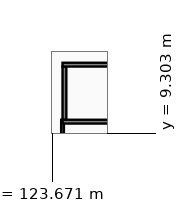
"""IFC4 building model, lengths in metres.
Left out: names, types, materials, properties, quantities, classifications, styles, units other than length and angle.
Written with IfcOpenShell. Run it as: python <this file> out.ifc"""

import sys

from ifc_helpers import new_model, si_unit, direction, frame, frame_2d, origin, place, context, subcontext, project, spatial, rectangle, extrude, element, fill, save


model = new_model("IFC4")
c1 = context("Model", 3, precision=1e-05, world=origin(), true_north=direction((0.0, 1.0)))
c2 = subcontext(c1, "Body", "Model", "MODEL_VIEW")
j1 = project(units=[si_unit("LENGTHUNIT", "METRE"), si_unit("PLANEANGLEUNIT", "RADIAN")], contexts=[c1])
p1 = place(None, origin())
s1 = spatial("IfcSite", under=j1, at=p1, CompositionType="ELEMENT")
p2 = place(p1, origin())
s2 = spatial("IfcBuilding", under=s1, at=p2, CompositionType="ELEMENT")
p3 = place(p2, frame((0.0, 0.0, 5.4)))
s3 = spatial("IfcBuildingStorey", under=s2, at=p3, CompositionType="ELEMENT", Elevation=5.4)
p4 = place(p3, frame((124.35, 8.96, 0.0), z_axis=(0.0, 0.0, 1.0), x_axis=(0.0, 1.0, 0.0)))
e1 = element("IfcWall", 1, at=p4, inside=s3, PredefinedType="PARTITIONING", context=c2, shape_type="SweptSolid", body=[
    extrude(rectangle(XDim=1.24, YDim=0.18, at=frame_2d((0.62, 0.0))), origin(), (0.0, 0.0, 1.0), 3.67),
])
p5 = place(p3, frame((124.475, 13.7, 0.0), z_axis=(0.0, 0.0, 1.0), x_axis=(0.0, -1.0, 0.0)))
e2 = element("IfcWall", 2, at=p5, inside=s3, PredefinedType="SHEAR", context=c2, shape_type="SweptSolid", body=[
    extrude(rectangle(XDim=3.5, YDim=0.25, at=frame_2d((1.75, 0.0))), origin(), (0.0, 0.0, 1.0), 4.2),
])
p6 = place(p5, frame((1.1, 0.0, -0.01)))
e3 = element("IfcOpeningElement", 3, at=p6, cuts=e2, PredefinedType="OPENING", context=c2, shape_type="SweptSolid", body=[
    extrude(rectangle(XDim=1.3, YDim=2.16, at=frame_2d((0.65, 1.08))), frame((0.0, 0.135, 0.0), z_axis=(0.0, -1.0, 0.0), x_axis=(1.0, 0.0, 0.0)), (0.0, 0.0, 1.0), 0.27),
])
for number, where, z_axis, x_axis in (
    (4, (124.35, 10.075, 0.0), (0.0, 0.0, 1.0), (1.0, 0.0, 0.0)),
    (5, (124.35, 13.825, 0.0), (0.0, 0.0, 1.0), (1.0, 0.0, 0.0)),
):
    element("IfcWall", number, at=place(p3, frame(where, z_axis=z_axis, x_axis=x_axis)), inside=s3, PredefinedType="SHEAR", context=c2, shape_type="SweptSolid", body=[
        extrude(rectangle(XDim=8.9, YDim=0.25, at=frame_2d((4.45, 0.0))), origin(), (0.0, 0.0, 1.0), 4.2),
    ])
p7 = place(p6, frame((1.3, 0.0, 0.01), z_axis=(0.0, 0.0, 1.0), x_axis=(-1.0, 0.0, 0.0)))
e6 = element("IfcDoor", 6, at=p7, inside=s3, OperationType="SINGLE_SWING_LEFT", PredefinedType="DOOR", context=c2, shape_type="SweptSolid", body=[
    extrude(rectangle(XDim=1.3, YDim=2.15, at=frame_2d((0.65, 1.075))), frame((0.0, 0.025, 0.0), z_axis=(0.0, -1.0, 0.0), x_axis=(1.0, 0.0, 0.0)), (0.0, 0.0, 1.0), 0.05),
])
fill(e3, e6)
save(model, sys.argv[1])
